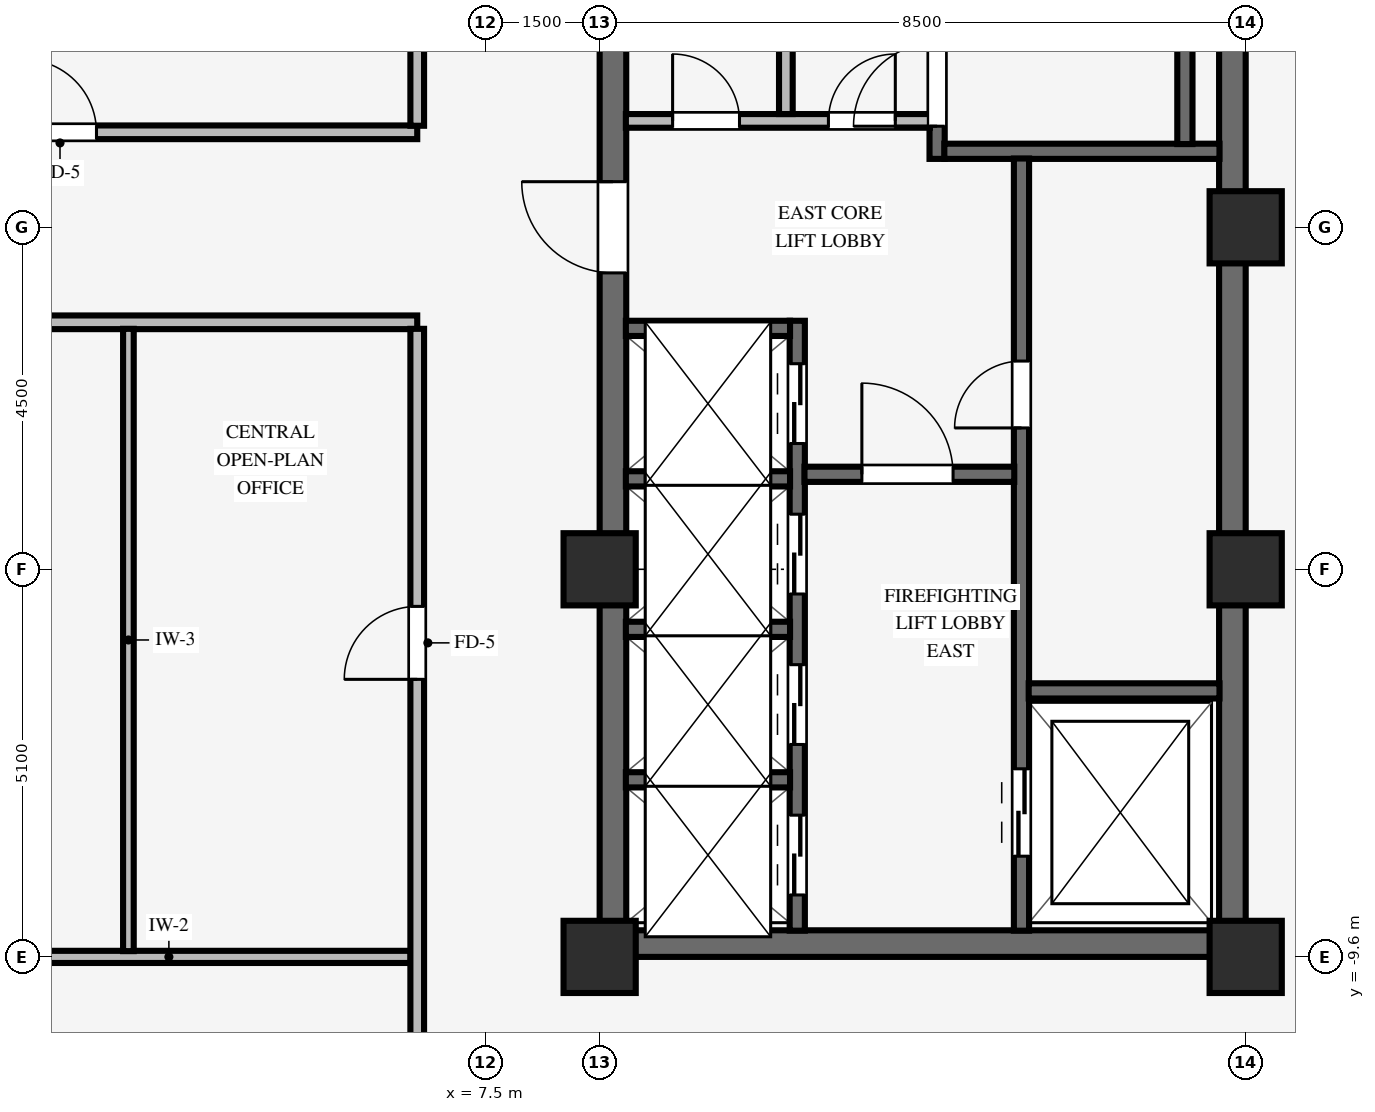
"""IFC4 building model, lengths in metres.
Left out: names, types, materials, properties, quantities, classifications, styles, units other than length and angle.
Written with IfcOpenShell. Run it as: python <this file> out.ifc"""

import sys

from ifc_helpers import new_model, si_unit, direction, frame, frame_2d, origin, origin_2d, place, context, subcontext, project, spatial, rectangle, extrude, source, transform, mapped, element, fill, save


model = new_model("IFC4")
c1 = context("Model", 3, precision=1e-05, world=origin(), true_north=direction((0.0, 1.0)))
c2 = subcontext(c1, "Body", "Model", "MODEL_VIEW")
j1 = project(units=[si_unit("LENGTHUNIT", "METRE"), si_unit("PLANEANGLEUNIT", "RADIAN")], contexts=[c1])
p1 = place(None, origin())
s1 = spatial("IfcSite", under=j1, at=p1, CompositionType="ELEMENT")
p2 = place(p1, origin())
s2 = spatial("IfcBuilding", under=s1, at=p2, CompositionType="ELEMENT")
p3 = place(p2, frame((0.0, 0.0, 194.55)))
s3 = spatial("IfcBuildingStorey", under=s2, at=p3, CompositionType="ELEMENT", Elevation=194.55)
p4 = place(p3, frame((9.0, -9.425, 0.0), z_axis=(0.0, 0.0, 1.0), x_axis=(1.0, 0.0, 0.0)))
e1 = element("IfcWall", 1, at=p4, inside=s3, PredefinedType="SHEAR", context=c2, shape_type="SweptSolid", body=[
    extrude(rectangle(XDim=8.5, YDim=0.35, at=frame_2d((4.25, 0.0))), origin(), (0.0, 0.0, 1.0), 3.37),
])
p5 = place(p3, frame((9.175, -9.255, 0.0), z_axis=(0.0, 0.0, 1.0), x_axis=(0.0, 1.0, 0.0)))
e2 = element("IfcWall", 2, at=p5, inside=s3, PredefinedType="SHEAR", context=c2, shape_type="SweptSolid", body=[
    extrude(rectangle(XDim=18.51, YDim=0.35, at=frame_2d((9.255, 0.0))), origin(), (0.0, 0.0, 1.0), 3.37),
])
p6 = place(p5, frame((8.655, 0.0, 0.0)))
e3 = element("IfcOpeningElement", 3, at=p6, cuts=e2, PredefinedType="OPENING", context=c2, shape_type="SweptSolid", body=[
    extrude(rectangle(XDim=1.2, YDim=2.15, at=frame_2d((0.6, 1.075))), frame((0.0, 0.185, 0.0), z_axis=(0.0, -1.0, 0.0), x_axis=(1.0, 0.0, 0.0)), (0.0, 0.0, 1.0), 0.37),
])
p7 = place(p3, frame((17.325, -9.255, 0.0), z_axis=(0.0, 0.0, 1.0), x_axis=(0.0, 1.0, 0.0)))
e4 = element("IfcWall", 4, at=p7, inside=s3, PredefinedType="SHEAR", context=c2, shape_type="SweptSolid", body=[
    extrude(rectangle(XDim=18.51, YDim=0.35, at=frame_2d((9.255, 0.0))), origin(), (0.0, 0.0, 1.0), 3.37),
])
for number, where, z_axis, x_axis in (
    (5, (9.0, -9.6, 0.0), (0.0, 0.0, 1.0), (1.0, 0.0, 0.0)),
    (6, (9.0, -4.5, 0.0), (0.0, 0.0, 1.0), (1.0, 0.0, 0.0)),
    (7, (17.5, -9.6, 0.0), (0.0, 0.0, 1.0), (1.0, 0.0, 0.0)),
    (8, (17.5, -4.5, 0.0), (0.0, 0.0, 1.0), (1.0, 0.0, 0.0)),
    (9, (17.5, 0.0, 0.0), (0.0, 0.0, 1.0), (1.0, 0.0, 0.0)),
):
    element("IfcColumn", number, at=place(p3, frame(where, z_axis=z_axis, x_axis=x_axis)), inside=s3, PredefinedType="COLUMN", context=c2, shape_type="SweptSolid", body=[
        extrude(rectangle(XDim=0.95, YDim=0.95, at=origin_2d()), origin(), (0.0, 0.0, 1.0), 3.37),
    ])
p8 = place(p3, frame((13.44, 0.9, 0.0), z_axis=(0.0, 0.0, 1.0), x_axis=(0.0, 1.0, 0.0)))
e10 = element("IfcWall", 10, at=p8, inside=s3, PredefinedType="SHEAR", context=c2, shape_type="SweptSolid", body=[
    extrude(rectangle(XDim=8.355, YDim=0.2, at=frame_2d((4.177, 0.0))), origin(), (0.0, 0.0, 1.0), 3.37),
])
p9 = place(p8, frame((0.43, 0.0, 0.0)))
e11 = element("IfcOpeningElement", 11, at=p9, cuts=e10, PredefinedType="OPENING", context=c2, shape_type="SweptSolid", body=[
    extrude(rectangle(XDim=1.1, YDim=2.15, at=frame_2d((0.55, 1.075))), frame((0.0, 0.11, 0.0), z_axis=(0.0, -1.0, 0.0), x_axis=(1.0, 0.0, 0.0)), (0.0, 0.0, 1.0), 0.22),
])
p10 = place(p3, frame((13.535, 1.0, 0.0), z_axis=(0.0, 0.0, 1.0), x_axis=(1.0, 0.0, 0.0)))
e12 = element("IfcWall", 12, at=p10, inside=s3, PredefinedType="SHEAR", context=c2, shape_type="SweptSolid", body=[
    extrude(rectangle(XDim=3.62, YDim=0.2, at=frame_2d((1.81, 0.0))), origin(), (0.0, 0.0, 1.0), 3.37),
])
p11 = place(p3, frame((16.7, 1.095, 0.0), z_axis=(0.0, 0.0, 1.0), x_axis=(0.0, 1.0, 0.0)))
e13 = element("IfcWall", 13, at=p11, inside=s3, PredefinedType="SHEAR", context=c2, shape_type="SweptSolid", body=[
    extrude(rectangle(XDim=8.16, YDim=0.2, at=frame_2d((4.08, 0.0))), origin(), (0.0, 0.0, 1.0), 3.37),
])
p12 = place(p3, frame((14.55, -9.255, 0.0), z_axis=(0.0, 0.0, 1.0), x_axis=(0.0, 1.0, 0.0)))
e14 = element("IfcWall", 14, at=p12, inside=s3, PredefinedType="SHEAR", context=c2, shape_type="SweptSolid", body=[
    extrude(rectangle(XDim=10.16, YDim=0.2, at=frame_2d((5.08, 0.0))), origin(), (0.0, 0.0, 1.0), 3.37),
])
p13 = place(p12, frame((6.615, 0.0, 0.0)))
e15 = element("IfcOpeningElement", 15, at=p13, cuts=e14, PredefinedType="OPENING", context=c2, shape_type="SweptSolid", body=[
    extrude(rectangle(XDim=0.88, YDim=2.1, at=frame_2d((0.44, 1.05))), frame((0.0, 0.11, 0.0), z_axis=(0.0, -1.0, 0.0), x_axis=(1.0, 0.0, 0.0)), (0.0, 0.0, 1.0), 0.22),
])
p14 = place(p12, frame((0.98, 0.0, 0.0)))
e16 = element("IfcOpeningElement", 16, at=p14, cuts=e14, PredefinedType="OPENING", context=c2, shape_type="SweptSolid", body=[
    extrude(rectangle(XDim=1.15, YDim=2.15, at=frame_2d((0.575, 1.075))), frame((0.0, 0.11, 0.0), z_axis=(0.0, -1.0, 0.0), x_axis=(1.0, 0.0, 0.0)), (0.0, 0.0, 1.0), 0.22),
])
p15 = place(p3, frame((14.645, -6.1, 0.0), z_axis=(0.0, 0.0, 1.0), x_axis=(1.0, 0.0, 0.0)))
e17 = element("IfcWall", 17, at=p15, inside=s3, PredefinedType="SHEAR", context=c2, shape_type="SweptSolid", body=[
    extrude(rectangle(XDim=2.51, YDim=0.2, at=frame_2d((1.255, 0.0))), origin(), (0.0, 0.0, 1.0), 3.37),
])
p16 = place(p3, frame((11.6, -9.255, 0.0), z_axis=(0.0, 0.0, 1.0), x_axis=(0.0, 1.0, 0.0)))
e18 = element("IfcWall", 18, at=p16, inside=s3, PredefinedType="SHEAR", context=c2, shape_type="SweptSolid", body=[
    extrude(rectangle(XDim=8.025, YDim=0.2, at=frame_2d((4.012, 0.0))), origin(), (0.0, 0.0, 1.0), 3.37),
])
p17 = place(p16, frame((0.47, 0.0, 0.0)))
e19 = element("IfcOpeningElement", 19, at=p17, cuts=e18, PredefinedType="OPENING", context=c2, shape_type="SweptSolid", body=[
    extrude(rectangle(XDim=1.05, YDim=2.15, at=frame_2d((0.525, 1.075))), frame((0.0, 0.11, 0.0), z_axis=(0.0, -1.0, 0.0), x_axis=(1.0, 0.0, 0.0)), (0.0, 0.0, 1.0), 0.22),
])
p18 = place(p16, frame((2.45, 0.0, 0.0)))
e20 = element("IfcOpeningElement", 20, at=p18, cuts=e18, PredefinedType="OPENING", context=c2, shape_type="SweptSolid", body=[
    extrude(rectangle(XDim=1.05, YDim=2.15, at=frame_2d((0.525, 1.075))), frame((0.0, 0.11, 0.0), z_axis=(0.0, -1.0, 0.0), x_axis=(1.0, 0.0, 0.0)), (0.0, 0.0, 1.0), 0.22),
])
p19 = place(p16, frame((4.43, 0.0, 0.0)))
e21 = element("IfcOpeningElement", 21, at=p19, cuts=e18, PredefinedType="OPENING", context=c2, shape_type="SweptSolid", body=[
    extrude(rectangle(XDim=1.05, YDim=2.15, at=frame_2d((0.525, 1.075))), frame((0.0, 0.11, 0.0), z_axis=(0.0, -1.0, 0.0), x_axis=(1.0, 0.0, 0.0)), (0.0, 0.0, 1.0), 0.22),
])
p20 = place(p16, frame((6.41, 0.0, 0.0)))
e22 = element("IfcOpeningElement", 22, at=p20, cuts=e18, PredefinedType="OPENING", context=c2, shape_type="SweptSolid", body=[
    extrude(rectangle(XDim=1.05, YDim=2.15, at=frame_2d((0.525, 1.075))), frame((0.0, 0.11, 0.0), z_axis=(0.0, -1.0, 0.0), x_axis=(1.0, 0.0, 0.0)), (0.0, 0.0, 1.0), 0.22),
])
p21 = place(p3, frame((11.695, -3.25, 0.0), z_axis=(0.0, 0.0, 1.0), x_axis=(1.0, 0.0, 0.0)))
e23 = element("IfcWall", 23, at=p21, inside=s3, PredefinedType="SHEAR", context=c2, shape_type="SweptSolid", body=[
    extrude(rectangle(XDim=2.76, YDim=0.2, at=frame_2d((1.38, 0.0))), origin(), (0.0, 0.0, 1.0), 3.37),
])
p22 = place(p21, frame((0.755, 0.0, 0.0)))
e24 = element("IfcOpeningElement", 24, at=p22, cuts=e23, PredefinedType="OPENING", context=c2, shape_type="SweptSolid", body=[
    extrude(rectangle(XDim=1.2, YDim=2.15, at=frame_2d((0.6, 1.075))), frame((0.0, 0.11, 0.0), z_axis=(0.0, -1.0, 0.0), x_axis=(1.0, 0.0, 0.0)), (0.0, 0.0, 1.0), 0.22),
])
for number, where, z_axis, x_axis in (
    (25, (9.345, -7.27, 0.0), (0.0, 0.0, 1.0), (1.0, 0.0, 0.0)),
    (26, (9.345, -5.29, 0.0), (0.0, 0.0, 1.0), (1.0, 0.0, 0.0)),
    (27, (9.345, -3.31, 0.0), (0.0, 0.0, 1.0), (1.0, 0.0, 0.0)),
    (28, (9.345, -1.33, 0.0), (0.0, 0.0, 1.0), (1.0, 0.0, 0.0)),
):
    element("IfcWall", number, at=place(p3, frame(where, z_axis=z_axis, x_axis=x_axis)), inside=s3, PredefinedType="SHEAR", context=c2, shape_type="SweptSolid", body=[
        extrude(rectangle(XDim=2.16, YDim=0.2, at=frame_2d((1.08, 0.0))), origin(), (0.0, 0.0, 1.0), 3.37),
    ])
p23 = place(p3, frame((9.345, 1.4, 0.0), z_axis=(0.0, 0.0, 1.0), x_axis=(1.0, 0.0, 0.0)))
e29 = element("IfcWall", 29, at=p23, inside=s3, PredefinedType="PARTITIONING", context=c2, shape_type="SweptSolid", body=[
    extrude(rectangle(XDim=4.0, YDim=0.18, at=frame_2d((2.0, 0.0))), origin(), (0.0, 0.0, 1.0), 3.36),
])
p24 = place(p23, frame((0.615, 0.0, 0.0)))
e30 = element("IfcOpeningElement", 30, at=p24, cuts=e29, PredefinedType="OPENING", context=c2, shape_type="SweptSolid", body=[
    extrude(rectangle(XDim=0.88, YDim=2.1, at=frame_2d((0.44, 1.05))), frame((0.0, 0.1, 0.0), z_axis=(0.0, -1.0, 0.0), x_axis=(1.0, 0.0, 0.0)), (0.0, 0.0, 1.0), 0.2),
])
p25 = place(p23, frame((2.665, 0.0, 0.0)))
e31 = element("IfcOpeningElement", 31, at=p25, cuts=e29, PredefinedType="OPENING", context=c2, shape_type="SweptSolid", body=[
    extrude(rectangle(XDim=0.88, YDim=2.1, at=frame_2d((0.44, 1.05))), frame((0.0, 0.1, 0.0), z_axis=(0.0, -1.0, 0.0), x_axis=(1.0, 0.0, 0.0)), (0.0, 0.0, 1.0), 0.2),
])
p26 = place(p3, frame((11.45, 1.49, 0.0), z_axis=(0.0, 0.0, 1.0), x_axis=(0.0, 1.0, 0.0)))
e32 = element("IfcWall", 32, at=p26, inside=s3, PredefinedType="PARTITIONING", context=c2, shape_type="SweptSolid", body=[
    extrude(rectangle(XDim=7.765, YDim=0.18, at=frame_2d((3.882, 0.0))), origin(), (0.0, 0.0, 1.0), 3.36),
])
p27 = place(p3, frame((0.151, -9.6, 0.0), z_axis=(0.0, 0.0, 1.0), x_axis=(1.0, 0.0, 0.0)))
e33 = element("IfcWall", 33, at=p27, inside=s3, PredefinedType="PARTITIONING", context=c2, shape_type="SweptSolid", body=[
    extrude(rectangle(XDim=6.363, YDim=0.16, at=frame_2d((3.182, 0.0))), origin(), (0.0, 0.0, 1.0), 2.405),
])
p28 = place(p3, frame((-9.0, -1.25, 0.0), z_axis=(0.0, 0.0, 1.0), x_axis=(1.0, 0.0, 0.0)))
e34 = element("IfcWall", 34, at=p28, inside=s3, PredefinedType="PARTITIONING", context=c2, shape_type="SweptSolid", body=[
    extrude(rectangle(XDim=15.6, YDim=0.18, at=frame_2d((7.8, 0.0))), origin(), (0.0, 0.0, 1.0), 3.36),
])
p29 = place(p28, frame((5.42, 0.0, 0.0)))
e35 = element("IfcOpeningElement", 35, at=p29, cuts=e34, PredefinedType="OPENING", context=c2, shape_type="SweptSolid", body=[
    extrude(rectangle(XDim=0.96, YDim=2.1, at=frame_2d((0.48, 1.05))), frame((0.0, 0.1, 0.0), z_axis=(0.0, -1.0, 0.0), x_axis=(1.0, 0.0, 0.0)), (0.0, 0.0, 1.0), 0.2),
])
p30 = place(p3, frame((-9.0, 1.25, 0.0), z_axis=(0.0, 0.0, 1.0), x_axis=(1.0, 0.0, 0.0)))
e36 = element("IfcWall", 36, at=p30, inside=s3, PredefinedType="PARTITIONING", context=c2, shape_type="SweptSolid", body=[
    extrude(rectangle(XDim=15.6, YDim=0.18, at=frame_2d((7.8, 0.0))), origin(), (0.0, 0.0, 1.0), 3.36),
])
p31 = place(p30, frame((10.42, 0.0, 0.0)))
e37 = element("IfcOpeningElement", 37, at=p31, cuts=e36, PredefinedType="OPENING", context=c2, shape_type="SweptSolid", body=[
    extrude(rectangle(XDim=0.96, YDim=2.1, at=frame_2d((0.48, 1.05))), frame((0.0, 0.1, 0.0), z_axis=(0.0, -1.0, 0.0), x_axis=(1.0, 0.0, 0.0)), (0.0, 0.0, 1.0), 0.2),
])
p32 = place(p30, frame((2.62, 0.0, 0.0)))
e38 = element("IfcOpeningElement", 38, at=p32, cuts=e36, PredefinedType="OPENING", context=c2, shape_type="SweptSolid", body=[
    extrude(rectangle(XDim=0.96, YDim=2.1, at=frame_2d((0.48, 1.05))), frame((0.0, 0.1, 0.0), z_axis=(0.0, -1.0, 0.0), x_axis=(1.0, 0.0, 0.0)), (0.0, 0.0, 1.0), 0.2),
])
p33 = place(p3, frame((2.8, -9.524, 0.0), z_axis=(0.0, 0.0, 1.0), x_axis=(0.0, 1.0, 0.0)))
e39 = element("IfcWall", 39, at=p33, inside=s3, PredefinedType="PARTITIONING", context=c2, shape_type="SweptSolid", body=[
    extrude(rectangle(XDim=8.188, YDim=0.14, at=frame_2d((4.094, 0.0))), origin(), (0.0, 0.0, 1.0), 3.36),
])
p34 = place(p3, frame((6.6, -13.414, 0.0), z_axis=(0.0, 0.0, 1.0), x_axis=(0.0, 1.0, 0.0)))
e40 = element("IfcWall", 40, at=p34, inside=s3, PredefinedType="PARTITIONING", context=c2, shape_type="SweptSolid", body=[
    extrude(rectangle(XDim=12.078, YDim=0.18, at=frame_2d((6.039, 0.0))), origin(), (0.0, 0.0, 1.0), 3.36),
])
p35 = place(p34, frame((7.466, 0.0, 0.0)))
e41 = element("IfcOpeningElement", 41, at=p35, cuts=e40, PredefinedType="OPENING", context=c2, shape_type="SweptSolid", body=[
    extrude(rectangle(XDim=0.96, YDim=2.1, at=frame_2d((0.48, 1.05))), frame((0.0, 0.1, 0.0), z_axis=(0.0, -1.0, 0.0), x_axis=(1.0, 0.0, 0.0)), (0.0, 0.0, 1.0), 0.2),
])
p36 = place(p3, frame((6.6, 1.336, 0.0), z_axis=(0.0, 0.0, 1.0), x_axis=(0.0, 1.0, 0.0)))
e42 = element("IfcWall", 42, at=p36, inside=s3, PredefinedType="PARTITIONING", context=c2, shape_type="SweptSolid", body=[
    extrude(rectangle(XDim=12.078, YDim=0.18, at=frame_2d((6.039, 0.0))), origin(), (0.0, 0.0, 1.0), 3.36),
])
m1 = source(origin(), c2, "Body", "SweptSolid", [
    extrude(rectangle(XDim=1.1, YDim=2.15, at=frame_2d((0.55, 1.075))), frame((0.0, 0.025, 0.0), z_axis=(0.0, -1.0, 0.0), x_axis=(1.0, 0.0, 0.0)), (0.0, 0.0, 1.0), 0.05),
])
p37 = place(p9, origin())
e43 = element("IfcDoor", 43, at=p37, inside=s3, OperationType="SINGLE_SWING_LEFT", PredefinedType="DOOR", context=c2, shape_type="MappedRepresentation", body=[
    mapped(m1, transform((0.0, 0.0, 0.0), scale=1.0)),
])
fill(e11, e43)
m2 = source(origin(), c2, "Body", "SweptSolid", [
    extrude(rectangle(XDim=0.88, YDim=2.1, at=frame_2d((0.44, 1.05))), frame((0.0, 0.025, 0.0), z_axis=(0.0, -1.0, 0.0), x_axis=(1.0, 0.0, 0.0)), (0.0, 0.0, 1.0), 0.05),
])
p38 = place(p13, origin())
e44 = element("IfcDoor", 44, at=p38, inside=s3, OperationType="SINGLE_SWING_LEFT", PredefinedType="DOOR", context=c2, shape_type="MappedRepresentation", body=[
    mapped(m2, transform((0.0, 0.0, 0.0), scale=1.0)),
])
fill(e15, e44)
m3 = source(origin(), c2, "Body", "SweptSolid", [
    extrude(rectangle(XDim=1.2, YDim=2.15, at=frame_2d((0.6, 1.075))), frame((0.0, 0.025, 0.0), z_axis=(0.0, -1.0, 0.0), x_axis=(1.0, 0.0, 0.0)), (0.0, 0.0, 1.0), 0.05),
])
p39 = place(p22, origin())
e45 = element("IfcDoor", 45, at=p39, inside=s3, OperationType="SINGLE_SWING_LEFT", PredefinedType="DOOR", context=c2, shape_type="MappedRepresentation", body=[
    mapped(m3, transform((0.0, 0.0, 0.0), scale=1.0)),
])
fill(e24, e45)
p40 = place(p6, origin())
e46 = element("IfcDoor", 46, at=p40, inside=s3, OperationType="SINGLE_SWING_RIGHT", PredefinedType="DOOR", context=c2, shape_type="MappedRepresentation", body=[
    mapped(m3, transform((0.0, 0.0, 0.0), scale=1.0)),
])
fill(e3, e46)
p41 = place(p24, origin())
e47 = element("IfcDoor", 47, at=p41, inside=s3, OperationType="SINGLE_SWING_LEFT", PredefinedType="DOOR", context=c2, shape_type="MappedRepresentation", body=[
    mapped(m2, transform((0.0, 0.0, 0.0), scale=1.0)),
])
fill(e30, e47)
p42 = place(p25, origin())
e48 = element("IfcDoor", 48, at=p42, inside=s3, OperationType="SINGLE_SWING_RIGHT", PredefinedType="DOOR", context=c2, shape_type="MappedRepresentation", body=[
    mapped(m2, transform((0.0, 0.0, 0.0), scale=1.0)),
])
fill(e31, e48)
m4 = source(origin(), c2, "Body", "SweptSolid", [
    extrude(rectangle(XDim=1.15, YDim=2.15, at=frame_2d((0.575, 1.075))), frame((0.0, 0.025, 0.0), z_axis=(0.0, -1.0, 0.0), x_axis=(1.0, 0.0, 0.0)), (0.0, 0.0, 1.0), 0.05),
])
p43 = place(p14, origin())
e49 = element("IfcDoor", 49, at=p43, inside=s3, OperationType="DOUBLE_DOOR_SLIDING", PredefinedType="DOOR", context=c2, shape_type="MappedRepresentation", body=[
    mapped(m4, transform((0.0, 0.0, 0.0), scale=1.0)),
])
fill(e16, e49)
m5 = source(origin(), c2, "Body", "SweptSolid", [
    extrude(rectangle(XDim=1.05, YDim=2.15, at=frame_2d((0.525, 1.075))), frame((0.0, 0.025, 0.0), z_axis=(0.0, -1.0, 0.0), x_axis=(1.0, 0.0, 0.0)), (0.0, 0.0, 1.0), 0.05),
])
p44 = place(p17, origin())
e50 = element("IfcDoor", 50, at=p44, inside=s3, OperationType="DOUBLE_DOOR_SLIDING", PredefinedType="DOOR", context=c2, shape_type="MappedRepresentation", body=[
    mapped(m5, transform((0.0, 0.0, 0.0), scale=1.0)),
])
fill(e19, e50)
p45 = place(p18, origin())
e51 = element("IfcDoor", 51, at=p45, inside=s3, OperationType="DOUBLE_DOOR_SLIDING", PredefinedType="DOOR", context=c2, shape_type="MappedRepresentation", body=[
    mapped(m5, transform((0.0, 0.0, 0.0), scale=1.0)),
])
fill(e20, e51)
p46 = place(p19, origin())
e52 = element("IfcDoor", 52, at=p46, inside=s3, OperationType="DOUBLE_DOOR_SLIDING", PredefinedType="DOOR", context=c2, shape_type="MappedRepresentation", body=[
    mapped(m5, transform((0.0, 0.0, 0.0), scale=1.0)),
])
fill(e21, e52)
p47 = place(p20, origin())
e53 = element("IfcDoor", 53, at=p47, inside=s3, OperationType="DOUBLE_DOOR_SLIDING", PredefinedType="DOOR", context=c2, shape_type="MappedRepresentation", body=[
    mapped(m5, transform((0.0, 0.0, 0.0), scale=1.0)),
])
fill(e22, e53)
m6 = source(origin(), c2, "Body", "SweptSolid", [
    extrude(rectangle(XDim=0.96, YDim=2.1, at=frame_2d((0.48, 1.05))), frame((0.0, 0.025, 0.0), z_axis=(0.0, -1.0, 0.0), x_axis=(1.0, 0.0, 0.0)), (0.0, 0.0, 1.0), 0.05),
])
p48 = place(p31, origin())
e54 = element("IfcDoor", 54, at=p48, inside=s3, OperationType="SINGLE_SWING_LEFT", PredefinedType="DOOR", context=c2, shape_type="MappedRepresentation", body=[
    mapped(m6, transform((0.0, 0.0, 0.0), scale=1.0)),
])
fill(e37, e54)
p49 = place(p35, origin())
e55 = element("IfcDoor", 55, at=p49, inside=s3, OperationType="SINGLE_SWING_LEFT", PredefinedType="DOOR", context=c2, shape_type="MappedRepresentation", body=[
    mapped(m6, transform((0.0, 0.0, 0.0), scale=1.0)),
])
fill(e41, e55)
save(model, sys.argv[1])
